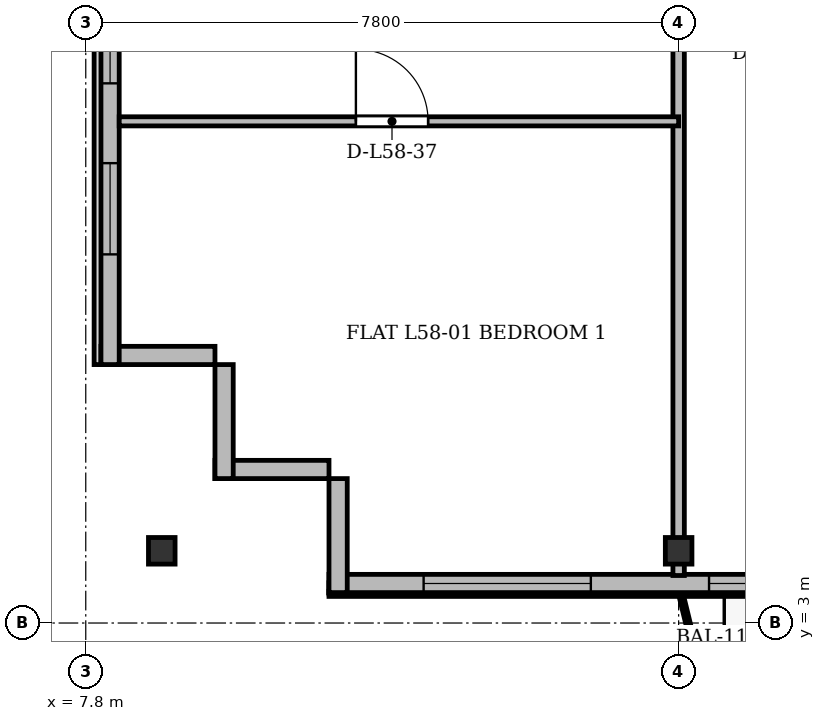
"""IFC4 building model, lengths in metres.
Left out: names, types, materials, properties, quantities, classifications, styles, units other than length and angle.
Written with IfcOpenShell. Run it as: python <this file> out.ifc"""

import sys

from ifc_helpers import new_model, si_unit, direction, frame, frame_2d, origin, origin_2d, place, context, subcontext, project, spatial, rectangle, i_section, extrude, source, transform, mapped, element, fill, save


model = new_model("IFC4")
c1 = context("Model", 3, precision=1e-05, world=origin(), true_north=direction((0.0, 1.0)))
c2 = subcontext(c1, "Body", "Model", "MODEL_VIEW")
j1 = project(units=[si_unit("LENGTHUNIT", "METRE"), si_unit("PLANEANGLEUNIT", "RADIAN")], contexts=[c1])
p1 = place(None, origin())
s1 = spatial("IfcSite", under=j1, at=p1, CompositionType="ELEMENT")
p2 = place(p1, origin())
s2 = spatial("IfcBuilding", under=s1, at=p2, CompositionType="ELEMENT")
p3 = place(p2, frame((0.0, 0.0, 222.9)))
s3 = spatial("IfcBuildingStorey", under=s2, at=p3, CompositionType="ELEMENT", Elevation=222.9)
m1 = source(origin(), c2, "Body", "SweptSolid", [
    extrude(i_section(OverallWidth=0.35, OverallDepth=0.35, WebThickness=0.018, FlangeThickness=0.028, at=origin_2d()), origin(), (0.0, 0.0, 1.0), 3.6),
])
for number, where, z_axis, x_axis in (
    (1, (8.8, 3.95, 0.0), (0.0, 0.0, 1.0), (1.0, 0.0, 0.0)),
    (2, (15.6, 3.95, 0.0), (0.0, 0.0, 1.0), (1.0, 0.0, 0.0)),
):
    element("IfcColumn", number, at=place(p3, frame(where, z_axis=z_axis, x_axis=x_axis)), inside=s3, PredefinedType="COLUMN", context=c2, shape_type="MappedRepresentation", body=[
        mapped(m1, transform((0.0, 0.0, 0.0), x_axis=(1.0, 0.0, 0.0), y_axis=(0.0, 1.0, 0.0), z_axis=(0.0, 0.0, 1.0), scale=1.0)),
    ])
for number, where, z_axis, x_axis in (
    (3, (11.0, 5.02, 0.0), (0.0, 0.0, 1.0), (-1.0, 0.0, 0.0)),
    (4, (9.62, 4.9, 0.0), (0.0, 0.0, 1.0), (0.0, 1.0, 0.0)),
):
    element("IfcWall", number, at=place(p3, frame(where, z_axis=z_axis, x_axis=x_axis)), inside=s3, PredefinedType="SOLIDWALL", context=c2, shape_type="SweptSolid", body=[
        extrude(rectangle(XDim=1.5, YDim=0.24, at=frame_2d((0.75, 0.0))), origin(), (0.0, 0.0, 1.0), 3.36),
    ])
p4 = place(p3, frame((9.5, 6.52, 0.0), z_axis=(0.0, 0.0, 1.0), x_axis=(-1.0, 0.0, 0.0)))
e5 = element("IfcWall", 5, at=p4, inside=s3, PredefinedType="SOLIDWALL", context=c2, shape_type="SweptSolid", body=[
    extrude(rectangle(XDim=1.5, YDim=0.24, at=frame_2d((0.75, 0.0))), origin(), (0.0, 0.0, 1.0), 2.86),
])
p5 = place(p3, frame((8.12, 6.4, 0.0), z_axis=(0.0, 0.0, 1.0), x_axis=(0.0, 1.0, 0.0)))
e6 = element("IfcWall", 6, at=p5, inside=s3, PredefinedType="SOLIDWALL", context=c2, shape_type="SweptSolid", body=[
    extrude(rectangle(XDim=39.1, YDim=0.24, at=frame_2d((19.55, 0.0))), origin(), (0.0, 0.0, 1.0), 3.36),
])
p6 = place(p5, frame((1.45, 0.0, 0.92)))
e7 = element("IfcOpeningElement", 7, at=p6, cuts=e6, PredefinedType="OPENING", context=c2, shape_type="SweptSolid", body=[
    extrude(rectangle(XDim=1.2, YDim=1.65, at=frame_2d((0.6, 0.825))), frame((0.0, 0.13, 0.0), z_axis=(0.0, -1.0, 0.0), x_axis=(1.0, 0.0, 0.0)), (0.0, 0.0, 1.0), 0.26),
])
p7 = place(p5, frame((3.7, 0.0, 0.92)))
e8 = element("IfcOpeningElement", 8, at=p7, cuts=e6, PredefinedType="OPENING", context=c2, shape_type="SweptSolid", body=[
    extrude(rectangle(XDim=2.6, YDim=1.9, at=frame_2d((1.3, 0.95))), frame((0.0, 0.13, 0.0), z_axis=(0.0, -1.0, 0.0), x_axis=(1.0, 0.0, 0.0)), (0.0, 0.0, 1.0), 0.26),
])
p8 = place(p5, frame((7.9, 0.0, 0.92)))
e9 = element("IfcOpeningElement", 9, at=p8, cuts=e6, PredefinedType="OPENING", context=c2, shape_type="SweptSolid", body=[
    extrude(rectangle(XDim=2.6, YDim=1.9, at=frame_2d((1.3, 0.95))), frame((0.0, 0.13, 0.0), z_axis=(0.0, -1.0, 0.0), x_axis=(1.0, 0.0, 0.0)), (0.0, 0.0, 1.0), 0.26),
])
p9 = place(p5, frame((15.1, 0.0, 0.92)))
e10 = element("IfcOpeningElement", 10, at=p9, cuts=e6, PredefinedType="OPENING", context=c2, shape_type="SweptSolid", body=[
    extrude(rectangle(XDim=2.6, YDim=1.9, at=frame_2d((1.3, 0.95))), frame((0.0, 0.13, 0.0), z_axis=(0.0, -1.0, 0.0), x_axis=(1.0, 0.0, 0.0)), (0.0, 0.0, 1.0), 0.26),
])
p10 = place(p5, frame((33.4, 0.0, 0.92)))
e11 = element("IfcOpeningElement", 11, at=p10, cuts=e6, PredefinedType="OPENING", context=c2, shape_type="SweptSolid", body=[
    extrude(rectangle(XDim=1.2, YDim=1.65, at=frame_2d((0.6, 0.825))), frame((0.0, 0.13, 0.0), z_axis=(0.0, -1.0, 0.0), x_axis=(1.0, 0.0, 0.0)), (0.0, 0.0, 1.0), 0.26),
])
p11 = place(p5, frame((36.75, 0.0, 0.92)))
e12 = element("IfcOpeningElement", 12, at=p11, cuts=e6, PredefinedType="OPENING", context=c2, shape_type="SweptSolid", body=[
    extrude(rectangle(XDim=1.2, YDim=1.65, at=frame_2d((0.6, 0.825))), frame((0.0, 0.13, 0.0), z_axis=(0.0, -1.0, 0.0), x_axis=(1.0, 0.0, 0.0)), (0.0, 0.0, 1.0), 0.26),
])
p12 = place(p3, frame((63.4, 3.52, 0.0), z_axis=(0.0, 0.0, 1.0), x_axis=(-1.0, 0.0, 0.0)))
e13 = element("IfcWall", 13, at=p12, inside=s3, PredefinedType="SOLIDWALL", context=c2, shape_type="SweptSolid", body=[
    extrude(rectangle(XDim=52.4, YDim=0.24, at=frame_2d((26.2, 0.0))), origin(), (0.0, 0.0, 1.0), 3.36),
])
p13 = place(p12, frame((1.345, 0.0, 0.9)))
e14 = element("IfcOpeningElement", 14, at=p13, cuts=e13, PredefinedType="OPENING", context=c2, shape_type="SweptSolid", body=[
    extrude(rectangle(XDim=2.0, YDim=1.95, at=frame_2d((1.0, 0.975))), frame((0.0, 0.13, 0.0), z_axis=(0.0, -1.0, 0.0), x_axis=(1.0, 0.0, 0.0)), (0.0, 0.0, 1.0), 0.26),
])
p14 = place(p12, frame((7.675, 0.0, 0.9)))
e15 = element("IfcOpeningElement", 15, at=p14, cuts=e13, PredefinedType="OPENING", context=c2, shape_type="SweptSolid", body=[
    extrude(rectangle(XDim=1.65, YDim=1.85, at=frame_2d((0.825, 0.925))), frame((0.0, 0.13, 0.0), z_axis=(0.0, -1.0, 0.0), x_axis=(1.0, 0.0, 0.0)), (0.0, 0.0, 1.0), 0.26),
])
p15 = place(p12, frame((13.42, 0.0, 0.0)))
e16 = element("IfcOpeningElement", 16, at=p15, cuts=e13, PredefinedType="OPENING", context=c2, shape_type="SweptSolid", body=[
    extrude(rectangle(XDim=1.2, YDim=2.2, at=frame_2d((0.6, 1.1))), frame((0.0, 0.13, 0.0), z_axis=(0.0, -1.0, 0.0), x_axis=(1.0, 0.0, 0.0)), (0.0, 0.0, 1.0), 0.26),
])
p16 = place(p12, frame((15.25, 0.0, 0.9)))
e17 = element("IfcOpeningElement", 17, at=p16, cuts=e13, PredefinedType="OPENING", context=c2, shape_type="SweptSolid", body=[
    extrude(rectangle(XDim=1.5, YDim=1.75, at=frame_2d((0.75, 0.875))), frame((0.0, 0.13, 0.0), z_axis=(0.0, -1.0, 0.0), x_axis=(1.0, 0.0, 0.0)), (0.0, 0.0, 1.0), 0.26),
])
p17 = place(p12, frame((17.65, 0.0, 0.9)))
e18 = element("IfcOpeningElement", 18, at=p17, cuts=e13, PredefinedType="OPENING", context=c2, shape_type="SweptSolid", body=[
    extrude(rectangle(XDim=1.5, YDim=1.75, at=frame_2d((0.75, 0.875))), frame((0.0, 0.13, 0.0), z_axis=(0.0, -1.0, 0.0), x_axis=(1.0, 0.0, 0.0)), (0.0, 0.0, 1.0), 0.26),
])
p18 = place(p12, frame((20.25, 0.0, 0.9)))
e19 = element("IfcOpeningElement", 19, at=p18, cuts=e13, PredefinedType="OPENING", context=c2, shape_type="SweptSolid", body=[
    extrude(rectangle(XDim=2.0, YDim=1.95, at=frame_2d((1.0, 0.975))), frame((0.0, 0.13, 0.0), z_axis=(0.0, -1.0, 0.0), x_axis=(1.0, 0.0, 0.0)), (0.0, 0.0, 1.0), 0.26),
])
p19 = place(p12, frame((23.725, 0.0, 0.9)))
e20 = element("IfcOpeningElement", 20, at=p19, cuts=e13, PredefinedType="OPENING", context=c2, shape_type="SweptSolid", body=[
    extrude(rectangle(XDim=1.65, YDim=1.85, at=frame_2d((0.825, 0.925))), frame((0.0, 0.13, 0.0), z_axis=(0.0, -1.0, 0.0), x_axis=(1.0, 0.0, 0.0)), (0.0, 0.0, 1.0), 0.26),
])
p20 = place(p12, frame((28.6, 0.0, 0.9)))
e21 = element("IfcOpeningElement", 21, at=p20, cuts=e13, PredefinedType="OPENING", context=c2, shape_type="SweptSolid", body=[
    extrude(rectangle(XDim=1.8, YDim=1.8, at=frame_2d((0.9, 0.9))), frame((0.0, 0.13, 0.0), z_axis=(0.0, -1.0, 0.0), x_axis=(1.0, 0.0, 0.0)), (0.0, 0.0, 1.0), 0.26),
])
p21 = place(p12, frame((33.5, 0.0, 0.9)))
e22 = element("IfcOpeningElement", 22, at=p21, cuts=e13, PredefinedType="OPENING", context=c2, shape_type="SweptSolid", body=[
    extrude(rectangle(XDim=2.2, YDim=1.8, at=frame_2d((1.1, 0.9))), frame((0.0, 0.13, 0.0), z_axis=(0.0, -1.0, 0.0), x_axis=(1.0, 0.0, 0.0)), (0.0, 0.0, 1.0), 0.26),
])
p22 = place(p12, frame((37.45, 0.0, 0.9)))
e23 = element("IfcOpeningElement", 23, at=p22, cuts=e13, PredefinedType="OPENING", context=c2, shape_type="SweptSolid", body=[
    extrude(rectangle(XDim=1.5, YDim=1.75, at=frame_2d((0.75, 0.875))), frame((0.0, 0.13, 0.0), z_axis=(0.0, -1.0, 0.0), x_axis=(1.0, 0.0, 0.0)), (0.0, 0.0, 1.0), 0.26),
])
p23 = place(p12, frame((41.09, 0.0, 0.0)))
e24 = element("IfcOpeningElement", 24, at=p23, cuts=e13, PredefinedType="OPENING", context=c2, shape_type="SweptSolid", body=[
    extrude(rectangle(XDim=1.2, YDim=2.2, at=frame_2d((0.6, 1.1))), frame((0.0, 0.13, 0.0), z_axis=(0.0, -1.0, 0.0), x_axis=(1.0, 0.0, 0.0)), (0.0, 0.0, 1.0), 0.26),
])
p24 = place(p12, frame((43.075, 0.0, 0.9)))
e25 = element("IfcOpeningElement", 25, at=p24, cuts=e13, PredefinedType="OPENING", context=c2, shape_type="SweptSolid", body=[
    extrude(rectangle(XDim=1.65, YDim=1.85, at=frame_2d((0.825, 0.925))), frame((0.0, 0.13, 0.0), z_axis=(0.0, -1.0, 0.0), x_axis=(1.0, 0.0, 0.0)), (0.0, 0.0, 1.0), 0.26),
])
p25 = place(p12, frame((45.6, 0.0, 0.9)))
e26 = element("IfcOpeningElement", 26, at=p25, cuts=e13, PredefinedType="OPENING", context=c2, shape_type="SweptSolid", body=[
    extrude(rectangle(XDim=1.8, YDim=1.8, at=frame_2d((0.9, 0.9))), frame((0.0, 0.13, 0.0), z_axis=(0.0, -1.0, 0.0), x_axis=(1.0, 0.0, 0.0)), (0.0, 0.0, 1.0), 0.26),
])
p26 = place(p12, frame((48.955, 0.0, 0.9)))
e27 = element("IfcOpeningElement", 27, at=p26, cuts=e13, PredefinedType="OPENING", context=c2, shape_type="SweptSolid", body=[
    extrude(rectangle(XDim=2.2, YDim=1.8, at=frame_2d((1.1, 0.9))), frame((0.0, 0.13, 0.0), z_axis=(0.0, -1.0, 0.0), x_axis=(1.0, 0.0, 0.0)), (0.0, 0.0, 1.0), 0.26),
])
p27 = place(p3, frame((11.12, 3.4, 0.0), z_axis=(0.0, 0.0, 1.0), x_axis=(0.0, 1.0, 0.0)))
e28 = element("IfcWall", 28, at=p27, inside=s3, PredefinedType="SOLIDWALL", context=c2, shape_type="SweptSolid", body=[
    extrude(rectangle(XDim=1.5, YDim=0.24, at=frame_2d((0.75, 0.0))), origin(), (0.0, 0.0, 1.0), 2.91),
])
p28 = place(p3, frame((15.6, 3.625, 0.0), z_axis=(0.0, 0.0, 1.0), x_axis=(0.0, 1.0, 0.0)))
e29 = element("IfcWall", 29, at=p28, inside=s3, PredefinedType="PARTITIONING", context=c2, shape_type="SweptSolid", body=[
    extrude(rectangle(XDim=27.375, YDim=0.15, at=frame_2d((13.688, 0.0))), origin(), (0.0, 0.0, 1.0), 2.86),
])
p29 = place(p3, frame((8.24, 9.6, 0.0), z_axis=(0.0, 0.0, 1.0), x_axis=(1.0, 0.0, 0.0)))
e30 = element("IfcWall", 30, at=p29, inside=s3, PredefinedType="PARTITIONING", context=c2, shape_type="SweptSolid", body=[
    extrude(rectangle(XDim=7.36, YDim=0.12, at=frame_2d((3.68, 0.0))), origin(), (0.0, 0.0, 1.0), 2.86),
])
p30 = place(p29, frame((3.114, 0.0, 0.0)))
e31 = element("IfcOpeningElement", 31, at=p30, cuts=e30, PredefinedType="OPENING", context=c2, shape_type="SweptSolid", body=[
    extrude(rectangle(XDim=0.95, YDim=2.15, at=frame_2d((0.475, 1.075))), frame((0.0, 0.07, 0.0), z_axis=(0.0, -1.0, 0.0), x_axis=(1.0, 0.0, 0.0)), (0.0, 0.0, 1.0), 0.14),
])
m2 = source(origin(), c2, "Body", "SweptSolid", [
    extrude(rectangle(XDim=1.2, YDim=1.65, at=frame_2d((0.6, 0.825))), frame((0.0, 0.03, 0.0), z_axis=(0.0, -1.0, 0.0), x_axis=(1.0, 0.0, 0.0)), (0.0, 0.0, 1.0), 0.06),
])
p31 = place(p6, origin())
e32 = element("IfcWindow", 32, at=p31, inside=s3, PartitioningType="SINGLE_PANEL", PredefinedType="WINDOW", context=c2, shape_type="MappedRepresentation", body=[
    mapped(m2, transform((0.0, 0.0, 0.0), x_axis=(1.0, 0.0, 0.0), y_axis=(0.0, 1.0, 0.0), z_axis=(0.0, 0.0, 1.0), scale=1.0)),
])
fill(e7, e32)
m3 = source(origin(), c2, "Body", "SweptSolid", [
    extrude(rectangle(XDim=2.6, YDim=1.9, at=frame_2d((1.3, 0.95))), frame((0.0, 0.03, 0.0), z_axis=(0.0, -1.0, 0.0), x_axis=(1.0, 0.0, 0.0)), (0.0, 0.0, 1.0), 0.06),
])
p32 = place(p7, origin())
e33 = element("IfcWindow", 33, at=p32, inside=s3, PartitioningType="SINGLE_PANEL", PredefinedType="WINDOW", context=c2, shape_type="MappedRepresentation", body=[
    mapped(m3, transform((0.0, 0.0, 0.0), x_axis=(1.0, 0.0, 0.0), y_axis=(0.0, 1.0, 0.0), z_axis=(0.0, 0.0, 1.0), scale=1.0)),
])
fill(e8, e33)
m4 = source(origin(), c2, "Body", "SweptSolid", [
    extrude(rectangle(XDim=1.8, YDim=1.8, at=frame_2d((0.9, 0.9))), frame((0.0, 0.03, 0.0), z_axis=(0.0, -1.0, 0.0), x_axis=(1.0, 0.0, 0.0)), (0.0, 0.0, 1.0), 0.06),
])
p33 = place(p25, origin())
e34 = element("IfcWindow", 34, at=p33, inside=s3, PartitioningType="SINGLE_PANEL", PredefinedType="WINDOW", context=c2, shape_type="MappedRepresentation", body=[
    mapped(m4, transform((0.0, 0.0, 0.0), x_axis=(1.0, 0.0, 0.0), y_axis=(0.0, 1.0, 0.0), z_axis=(0.0, 0.0, 1.0), scale=1.0)),
])
fill(e26, e34)
m5 = source(origin(), c2, "Body", "SweptSolid", [
    extrude(rectangle(XDim=2.2, YDim=1.8, at=frame_2d((1.1, 0.9))), frame((0.0, 0.03, 0.0), z_axis=(0.0, -1.0, 0.0), x_axis=(1.0, 0.0, 0.0)), (0.0, 0.0, 1.0), 0.06),
])
p34 = place(p26, origin())
e35 = element("IfcWindow", 35, at=p34, inside=s3, PartitioningType="SINGLE_PANEL", PredefinedType="WINDOW", context=c2, shape_type="MappedRepresentation", body=[
    mapped(m5, transform((0.0, 0.0, 0.0), x_axis=(1.0, 0.0, 0.0), y_axis=(0.0, 1.0, 0.0), z_axis=(0.0, 0.0, 1.0), scale=1.0)),
])
fill(e27, e35)
m6 = source(origin(), c2, "Body", "SweptSolid", [
    extrude(rectangle(XDim=0.95, YDim=2.15, at=frame_2d((0.475, 1.075))), frame((0.0, 0.025, 0.0), z_axis=(0.0, -1.0, 0.0), x_axis=(1.0, 0.0, 0.0)), (0.0, 0.0, 1.0), 0.05),
])
p35 = place(p30, origin())
e36 = element("IfcDoor", 36, at=p35, inside=s3, OperationType="SINGLE_SWING_LEFT", PredefinedType="DOOR", context=c2, shape_type="MappedRepresentation", body=[
    mapped(m6, transform((0.0, 0.0, 0.0), x_axis=(1.0, 0.0, 0.0), y_axis=(0.0, 1.0, 0.0), z_axis=(0.0, 0.0, 1.0), scale=1.0)),
])
fill(e31, e36)
save(model, sys.argv[1])
